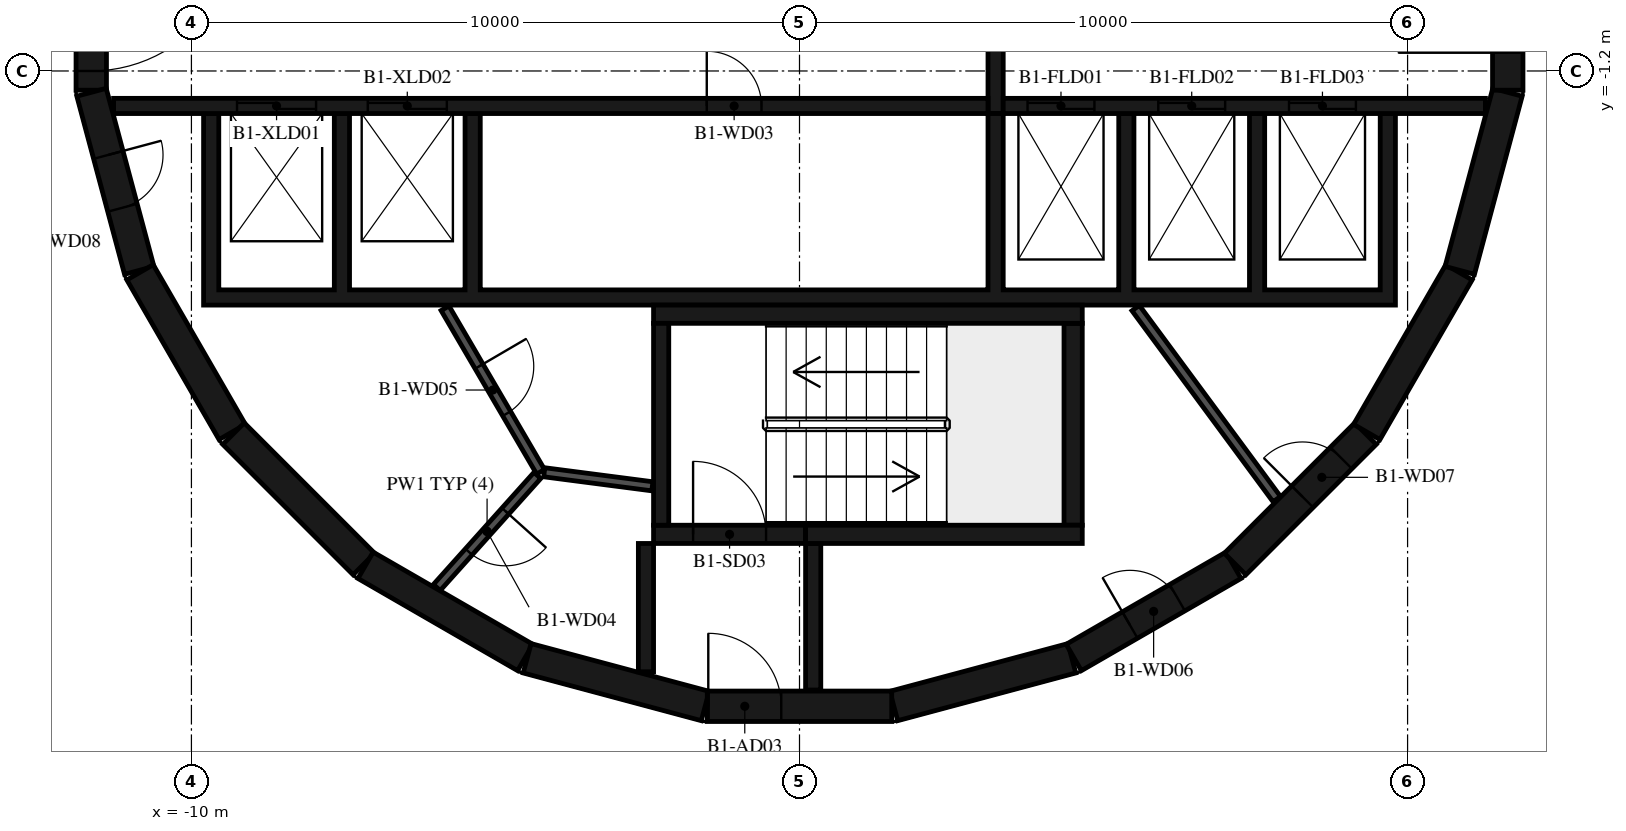
"""IFC4 building model, lengths in metres.
Left out: names, types, materials, properties, quantities, classifications, styles, units other than length and angle.
Written with IfcOpenShell. Run it as: python <this file> out.ifc"""

import sys

from ifc_helpers import new_model, si_unit, direction, frame, frame_2d, origin, place, context, subcontext, project, spatial, polyline, rectangle, outline, extrude, element, fill, save


model = new_model("IFC4")
c1 = context("Model", 3, precision=1e-05, world=origin(), true_north=direction((0.0, 1.0)))
c2 = subcontext(c1, "Body", "Model", "MODEL_VIEW")
j1 = project(units=[si_unit("LENGTHUNIT", "METRE"), si_unit("PLANEANGLEUNIT", "RADIAN")], contexts=[c1])
p1 = place(None, origin())
s1 = spatial("IfcSite", under=j1, at=p1, CompositionType="ELEMENT")
p2 = place(p1, origin())
s2 = spatial("IfcBuilding", under=s1, at=p2, CompositionType="ELEMENT")
p3 = place(p2, frame((0.0, 0.0, -4.2)))
s3 = spatial("IfcBuildingStorey", under=s2, at=p3, CompositionType="ELEMENT", Elevation=-4.2)
p4 = place(p3, frame((1.55, -11.643, 0.0), z_axis=(0.0, 0.0, 1.0), x_axis=(0.965948410781, 0.258734743916, 0.0)))
e1 = element("IfcWall", 1, at=p4, inside=s3, PredefinedType="SHEAR", context=c2, shape_type="SweptSolid", body=[
    extrude(rectangle(XDim=3.033, YDim=0.5, at=frame_2d((1.516, 0.0))), origin(), (0.0, 0.0, 1.0), 3.78),
])
p5 = place(p3, frame((4.51, -10.845, 0.0), z_axis=(0.0, 0.0, 1.0), x_axis=(0.865975092491, 0.500087131594, 0.0)))
e2 = element("IfcWall", 2, at=p5, inside=s3, PredefinedType="SHEAR", context=c2, shape_type="SweptSolid", body=[
    extrude(rectangle(XDim=3.033, YDim=0.5, at=frame_2d((1.516, 0.0))), origin(), (0.0, 0.0, 1.0), 3.78),
])
p6 = place(p5, frame((1.066, 0.0, 0.0)))
e3 = element("IfcOpeningElement", 3, at=p6, cuts=e2, PredefinedType="OPENING", context=c2, shape_type="SweptSolid", body=[
    extrude(rectangle(XDim=0.9, YDim=2.1, at=frame_2d((0.45, 1.05))), frame((0.0, 0.26, 0.0), z_axis=(0.0, -1.0, 0.0), x_axis=(1.0, 0.0, 0.0)), (0.0, 0.0, 1.0), 0.52),
])
p7 = place(p3, frame((7.164, -9.308, 0.0), z_axis=(0.0, 0.0, 1.0), x_axis=(0.707106781187, 0.707106781187, 0.0)))
e4 = element("IfcWall", 4, at=p7, inside=s3, PredefinedType="SHEAR", context=c2, shape_type="SweptSolid", body=[
    extrude(rectangle(XDim=3.032, YDim=0.5, at=frame_2d((1.516, 0.0))), origin(), (0.0, 0.0, 1.0), 3.78),
])
p8 = place(p7, frame((1.566, 0.0, 0.0)))
e5 = element("IfcOpeningElement", 5, at=p8, cuts=e4, PredefinedType="OPENING", context=c2, shape_type="SweptSolid", body=[
    extrude(rectangle(XDim=0.9, YDim=2.1, at=frame_2d((0.45, 1.05))), frame((0.0, 0.26, 0.0), z_axis=(0.0, -1.0, 0.0), x_axis=(1.0, 0.0, 0.0)), (0.0, 0.0, 1.0), 0.52),
])
for number, where, z_axis, x_axis in (
    (6, (9.329, -7.137, 0.0), (0.0, 0.0, 1.0), (0.5, 0.866, 0.0)),
    (7, (10.858, -4.479, 0.0), (0.0, 0.0, 1.0), (0.259, 0.966, 0.0)),
):
    element("IfcWall", number, at=place(p3, frame(where, z_axis=z_axis, x_axis=x_axis)), inside=s3, PredefinedType="SHEAR", context=c2, shape_type="SweptSolid", body=[
        extrude(rectangle(XDim=3.033, YDim=0.5, at=frame_2d((1.516, 0.0))), origin(), (0.0, 0.0, 1.0), 3.78),
    ])
p9 = place(p3, frame((11.647, -1.516, 0.0), z_axis=(0.0, 0.0, 1.0), x_axis=(0.0, 1.0, 0.0)))
e8 = element("IfcWall", 8, at=p9, inside=s3, PredefinedType="SHEAR", context=c2, shape_type="SweptSolid", body=[
    extrude(rectangle(XDim=3.033, YDim=0.5, at=frame_2d((1.516, 0.0))), origin(), (0.0, 0.0, 1.0), 3.78),
])
p10 = place(p9, frame((0.616, 0.0, 0.0)))
e9 = element("IfcOpeningElement", 9, at=p10, cuts=e8, PredefinedType="OPENING", context=c2, shape_type="SweptSolid", body=[
    extrude(rectangle(XDim=1.8, YDim=2.1, at=frame_2d((0.9, 1.05))), frame((0.0, 0.26, 0.0), z_axis=(0.0, -1.0, 0.0), x_axis=(1.0, 0.0, 0.0)), (0.0, 0.0, 1.0), 0.52),
])
p11 = place(p3, frame((-11.647, 1.516, 0.0), z_axis=(0.0, 0.0, 1.0), x_axis=(0.0, -1.0, 0.0)))
e10 = element("IfcWall", 10, at=p11, inside=s3, PredefinedType="SHEAR", context=c2, shape_type="SweptSolid", body=[
    extrude(rectangle(XDim=3.033, YDim=0.5, at=frame_2d((1.516, 0.0))), origin(), (0.0, 0.0, 1.0), 3.78),
])
p12 = place(p11, frame((0.316, 0.0, 0.0)))
e11 = element("IfcOpeningElement", 11, at=p12, cuts=e10, PredefinedType="OPENING", context=c2, shape_type="SweptSolid", body=[
    extrude(rectangle(XDim=2.4, YDim=2.1, at=frame_2d((1.2, 1.05))), frame((0.0, 0.26, 0.0), z_axis=(0.0, -1.0, 0.0), x_axis=(1.0, 0.0, 0.0)), (0.0, 0.0, 1.0), 0.52),
])
p13 = place(p3, frame((-11.643, -1.55, 0.0), z_axis=(0.0, 0.0, 1.0), x_axis=(0.258734743916, -0.965948410781, 0.0)))
e12 = element("IfcWall", 12, at=p13, inside=s3, PredefinedType="SHEAR", context=c2, shape_type="SweptSolid", body=[
    extrude(rectangle(XDim=3.033, YDim=0.5, at=frame_2d((1.516, 0.0))), origin(), (0.0, 0.0, 1.0), 3.78),
])
p14 = place(p13, frame((1.066, 0.0, 0.0)))
e13 = element("IfcOpeningElement", 13, at=p14, cuts=e12, PredefinedType="OPENING", context=c2, shape_type="SweptSolid", body=[
    extrude(rectangle(XDim=0.9, YDim=2.1, at=frame_2d((0.45, 1.05))), frame((0.0, 0.26, 0.0), z_axis=(0.0, -1.0, 0.0), x_axis=(1.0, 0.0, 0.0)), (0.0, 0.0, 1.0), 0.52),
])
p15 = place(p3, frame((-10.845, -4.51, 0.0), z_axis=(0.0, 0.0, 1.0), x_axis=(0.500087131594, -0.865975092491, 0.0)))
e14 = element("IfcWall", 14, at=p15, inside=s3, PredefinedType="SHEAR", context=c2, shape_type="SweptSolid", body=[
    extrude(rectangle(XDim=3.033, YDim=0.5, at=frame_2d((1.516, 0.0))), origin(), (0.0, 0.0, 1.0), 3.78),
])
p16 = place(p3, frame((-9.308, -7.164, 0.0), z_axis=(0.0, 0.0, 1.0), x_axis=(0.707106781187, -0.707106781187, 0.0)))
e15 = element("IfcWall", 15, at=p16, inside=s3, PredefinedType="SHEAR", context=c2, shape_type="SweptSolid", body=[
    extrude(rectangle(XDim=3.032, YDim=0.5, at=frame_2d((1.516, 0.0))), origin(), (0.0, 0.0, 1.0), 3.78),
])
for number, where, z_axis, x_axis in (
    (16, (-7.137, -9.329, 0.0), (0.0, 0.0, 1.0), (0.866, -0.5, 0.0)),
    (17, (-4.479, -10.858, 0.0), (0.0, 0.0, 1.0), (0.966, -0.259, 0.0)),
):
    element("IfcWall", number, at=place(p3, frame(where, z_axis=z_axis, x_axis=x_axis)), inside=s3, PredefinedType="SHEAR", context=c2, shape_type="SweptSolid", body=[
        extrude(rectangle(XDim=3.033, YDim=0.5, at=frame_2d((1.516, 0.0))), origin(), (0.0, 0.0, 1.0), 3.78),
    ])
p17 = place(p3, frame((-1.516, -11.647, 0.0), z_axis=(0.0, 0.0, 1.0), x_axis=(1.0, 0.0, 0.0)))
e18 = element("IfcWall", 18, at=p17, inside=s3, PredefinedType="SHEAR", context=c2, shape_type="SweptSolid", body=[
    extrude(rectangle(XDim=3.033, YDim=0.5, at=frame_2d((1.516, 0.0))), origin(), (0.0, 0.0, 1.0), 3.78),
])
p18 = place(p17, frame((0.016, 0.0, 0.0)))
e19 = element("IfcOpeningElement", 19, at=p18, cuts=e18, PredefinedType="OPENING", context=c2, shape_type="SweptSolid", body=[
    extrude(rectangle(XDim=1.2, YDim=2.1, at=frame_2d((0.6, 1.05))), frame((0.0, 0.26, 0.0), z_axis=(0.0, -1.0, 0.0), x_axis=(1.0, 0.0, 0.0)), (0.0, 0.0, 1.0), 0.52),
])
p19 = place(p3, frame((-2.275, -8.67, 0.0), z_axis=(0.0, 0.0, 1.0), x_axis=(0.0, 1.0, 0.0)))
e20 = element("IfcWall", 20, at=p19, inside=s3, PredefinedType="SHEAR", context=c2, shape_type="SweptSolid", body=[
    extrude(rectangle(XDim=3.32, YDim=0.25, at=frame_2d((1.66, 0.0))), origin(), (0.0, 0.0, 1.0), 3.78),
])
p20 = place(p3, frame((-2.4, -5.2, 0.0), z_axis=(0.0, 0.0, 1.0), x_axis=(1.0, 0.0, 0.0)))
e21 = element("IfcWall", 21, at=p20, inside=s3, PredefinedType="SHEAR", context=c2, shape_type="SweptSolid", body=[
    extrude(rectangle(XDim=7.05, YDim=0.3, at=frame_2d((3.525, 0.0))), origin(), (0.0, 0.0, 1.0), 3.78),
])
p21 = place(p3, frame((4.5, -8.67, 0.0), z_axis=(0.0, 0.0, 1.0), x_axis=(0.0, 1.0, 0.0)))
e22 = element("IfcWall", 22, at=p21, inside=s3, PredefinedType="SHEAR", context=c2, shape_type="SweptSolid", body=[
    extrude(rectangle(XDim=3.32, YDim=0.3, at=frame_2d((1.66, 0.0))), origin(), (0.0, 0.0, 1.0), 3.78),
])
p22 = place(p3, frame((0.1, -8.82, 0.0), z_axis=(0.0, 0.0, 1.0), x_axis=(1.0, 0.0, 0.0)))
e23 = element("IfcWall", 23, at=p22, inside=s3, PredefinedType="SHEAR", context=c2, shape_type="SweptSolid", body=[
    extrude(rectangle(XDim=4.55, YDim=0.3, at=frame_2d((2.275, 0.0))), origin(), (0.0, 0.0, 1.0), 3.78),
])
p23 = place(p3, frame((-2.4, -8.82, 0.0), z_axis=(0.0, 0.0, 1.0), x_axis=(1.0, 0.0, 0.0)))
e24 = element("IfcWall", 24, at=p23, inside=s3, PredefinedType="SHEAR", context=c2, shape_type="SweptSolid", body=[
    extrude(rectangle(XDim=2.5, YDim=0.3, at=frame_2d((1.25, 0.0))), origin(), (0.0, 0.0, 1.0), 3.78),
])
p24 = place(p23, frame((0.65, 0.0, 0.0)))
e25 = element("IfcOpeningElement", 25, at=p24, cuts=e24, PredefinedType="OPENING", context=c2, shape_type="SweptSolid", body=[
    extrude(rectangle(XDim=1.2, YDim=2.1, at=frame_2d((0.6, 1.05))), frame((0.0, 0.16, 0.0), z_axis=(0.0, -1.0, 0.0), x_axis=(1.0, 0.0, 0.0)), (0.0, 0.0, 1.0), 0.32),
])
p25 = place(p3, frame((-2.525, -8.97, 0.0), z_axis=(0.0, 0.0, 1.0), x_axis=(0.0, -1.0, 0.0)))
e26 = element("IfcWall", 26, at=p25, inside=s3, PredefinedType="SHEAR", context=c2, shape_type="SweptSolid", body=[
    extrude(rectangle(XDim=2.11, YDim=0.25, at=frame_2d((1.055, 0.0))), origin(), (0.0, 0.0, 1.0), 3.78),
])
p26 = place(p3, frame((0.225, -8.97, 0.0), z_axis=(0.0, 0.0, 1.0), x_axis=(0.0, -1.0, 0.0)))
e27 = element("IfcWall", 27, at=p26, inside=s3, PredefinedType="SHEAR", context=c2, shape_type="SweptSolid", body=[
    extrude(rectangle(XDim=2.41, YDim=0.25, at=frame_2d((1.205, 0.0))), origin(), (0.0, 0.0, 1.0), 3.78),
])
p27 = place(p3, origin())
e28 = element("IfcWall", 28, at=p27, inside=s3, PredefinedType="SHEAR", context=c2, shape_type="SweptSolid", body=[
    extrude(outline(polyline([(9.8, -5.05), (9.8, -4.8), (9.8, -1.9), (9.55, -1.9), (9.55, -4.8), (7.65, -4.8), (7.65, -1.9), (7.4, -1.9), (7.4, -4.8), (5.5, -4.8), (5.5, -1.9), (5.25, -1.9), (5.25, -4.8), (3.35, -4.8), (3.35, -1.9), (3.1, -1.9), (3.1, -4.8), (-5.25, -4.8), (-5.25, -1.9), (-5.5, -1.9), (-5.5, -4.8), (-7.4, -4.8), (-7.4, -1.9), (-7.65, -1.9), (-7.65, -4.8), (-9.55, -4.8), (-9.55, -1.9), (-9.8, -1.9), (-9.8, -4.8), (-9.8, -5.05), (9.8, -5.05)])), origin(), (0.0, 0.0, 1.0), 3.78),
])
p28 = place(p3, frame((-11.28, -1.775, 0.0), z_axis=(0.0, 0.0, 1.0), x_axis=(1.0, 0.0, 0.0)))
e29 = element("IfcWall", 29, at=p28, inside=s3, PredefinedType="SHEAR", context=c2, shape_type="SweptSolid", body=[
    extrude(rectangle(XDim=14.38, YDim=0.25, at=frame_2d((7.19, 0.0))), origin(), (0.0, 0.0, 1.0), 3.78),
])
p29 = place(p28, frame((2.03, 0.0, 0.0)))
e30 = element("IfcOpeningElement", 30, at=p29, cuts=e29, PredefinedType="OPENING", context=c2, shape_type="SweptSolid", body=[
    extrude(rectangle(XDim=1.3, YDim=2.1, at=frame_2d((0.65, 1.05))), frame((0.0, 0.135, 0.0), z_axis=(0.0, -1.0, 0.0), x_axis=(1.0, 0.0, 0.0)), (0.0, 0.0, 1.0), 0.27),
])
p30 = place(p28, frame((4.18, 0.0, 0.0)))
e31 = element("IfcOpeningElement", 31, at=p30, cuts=e29, PredefinedType="OPENING", context=c2, shape_type="SweptSolid", body=[
    extrude(rectangle(XDim=1.3, YDim=2.1, at=frame_2d((0.65, 1.05))), frame((0.0, 0.135, 0.0), z_axis=(0.0, -1.0, 0.0), x_axis=(1.0, 0.0, 0.0)), (0.0, 0.0, 1.0), 0.27),
])
p31 = place(p28, frame((9.755, 0.0, 0.0)))
e32 = element("IfcOpeningElement", 32, at=p31, cuts=e29, PredefinedType="OPENING", context=c2, shape_type="SweptSolid", body=[
    extrude(rectangle(XDim=0.9, YDim=2.1, at=frame_2d((0.45, 1.05))), frame((0.0, 0.135, 0.0), z_axis=(0.0, -1.0, 0.0), x_axis=(1.0, 0.0, 0.0)), (0.0, 0.0, 1.0), 0.27),
])
p32 = place(p3, frame((3.35, -1.775, 0.0), z_axis=(0.0, 0.0, 1.0), x_axis=(1.0, 0.0, 0.0)))
e33 = element("IfcWall", 33, at=p32, inside=s3, PredefinedType="SHEAR", context=c2, shape_type="SweptSolid", body=[
    extrude(rectangle(XDim=7.93, YDim=0.25, at=frame_2d((3.965, 0.0))), origin(), (0.0, 0.0, 1.0), 3.78),
])
p33 = place(p32, frame((0.4, 0.0, 0.0)))
e34 = element("IfcOpeningElement", 34, at=p33, cuts=e33, PredefinedType="OPENING", context=c2, shape_type="SweptSolid", body=[
    extrude(rectangle(XDim=1.1, YDim=2.4, at=frame_2d((0.55, 1.2))), frame((0.0, 0.135, 0.0), z_axis=(0.0, -1.0, 0.0), x_axis=(1.0, 0.0, 0.0)), (0.0, 0.0, 1.0), 0.27),
])
p34 = place(p32, frame((2.55, 0.0, 0.0)))
e35 = element("IfcOpeningElement", 35, at=p34, cuts=e33, PredefinedType="OPENING", context=c2, shape_type="SweptSolid", body=[
    extrude(rectangle(XDim=1.1, YDim=2.4, at=frame_2d((0.55, 1.2))), frame((0.0, 0.135, 0.0), z_axis=(0.0, -1.0, 0.0), x_axis=(1.0, 0.0, 0.0)), (0.0, 0.0, 1.0), 0.27),
])
p35 = place(p32, frame((4.7, 0.0, 0.0)))
e36 = element("IfcOpeningElement", 36, at=p35, cuts=e33, PredefinedType="OPENING", context=c2, shape_type="SweptSolid", body=[
    extrude(rectangle(XDim=1.1, YDim=2.4, at=frame_2d((0.55, 1.2))), frame((0.0, 0.135, 0.0), z_axis=(0.0, -1.0, 0.0), x_axis=(1.0, 0.0, 0.0)), (0.0, 0.0, 1.0), 0.27),
])
p36 = place(p3, frame((3.225, -1.9, 0.0), z_axis=(0.0, 0.0, 1.0), x_axis=(0.0, 1.0, 0.0)))
e37 = element("IfcWall", 37, at=p36, inside=s3, PredefinedType="SHEAR", context=c2, shape_type="SweptSolid", body=[
    extrude(rectangle(XDim=3.8, YDim=0.25, at=frame_2d((1.9, 0.0))), origin(), (0.0, 0.0, 1.0), 3.78),
])
p37 = place(p3, frame((5.528, -5.098, 0.0), z_axis=(0.0, 0.0, 1.0), x_axis=(0.594034318069, -0.804439698769, 0.0)))
e38 = element("IfcWall", 38, at=p37, inside=s3, PredefinedType="PARTITIONING", context=c2, shape_type="SweptSolid", body=[
    extrude(rectangle(XDim=3.907, YDim=0.15, at=frame_2d((1.953, 0.0))), origin(), (0.0, 0.0, 1.0), 3.78),
])
p38 = place(p3, frame((-5.829, -5.102, 0.0), z_axis=(0.0, 0.0, 1.0), x_axis=(0.504480008384, -0.863423373057, 0.0)))
e39 = element("IfcWall", 39, at=p38, inside=s3, PredefinedType="PARTITIONING", context=c2, shape_type="SweptSolid", body=[
    extrude(rectangle(XDim=3.115, YDim=0.15, at=frame_2d((1.558, 0.0))), origin(), (0.0, 0.0, 1.0), 3.78),
])
p39 = place(p38, frame((1.107, 0.0, 0.0)))
e40 = element("IfcOpeningElement", 40, at=p39, cuts=e39, PredefinedType="OPENING", context=c2, shape_type="SweptSolid", body=[
    extrude(rectangle(XDim=0.9, YDim=2.1, at=frame_2d((0.45, 1.05))), frame((0.0, 0.085, 0.0), z_axis=(0.0, -1.0, 0.0), x_axis=(1.0, 0.0, 0.0)), (0.0, 0.0, 1.0), 0.17),
])
p40 = place(p3, frame((-4.311, -7.851, 0.0), z_axis=(0.0, 0.0, 1.0), x_axis=(-0.667869133096, -0.744278725383, 0.0)))
e41 = element("IfcWall", 41, at=p40, inside=s3, PredefinedType="PARTITIONING", context=c2, shape_type="SweptSolid", body=[
    extrude(rectangle(XDim=2.476, YDim=0.15, at=frame_2d((1.238, 0.0))), origin(), (0.0, 0.0, 1.0), 3.78),
])
p41 = place(p40, frame((0.788, 0.0, 0.0)))
e42 = element("IfcOpeningElement", 42, at=p41, cuts=e41, PredefinedType="OPENING", context=c2, shape_type="SweptSolid", body=[
    extrude(rectangle(XDim=0.9, YDim=2.1, at=frame_2d((0.45, 1.05))), frame((0.0, 0.085, 0.0), z_axis=(0.0, -1.0, 0.0), x_axis=(1.0, 0.0, 0.0)), (0.0, 0.0, 1.0), 0.17),
])
p42 = place(p3, frame((-4.198, -7.799, 0.0), z_axis=(0.0, 0.0, 1.0), x_axis=(0.991686747293, -0.128675542523, 0.0)))
e43 = element("IfcWall", 43, at=p42, inside=s3, PredefinedType="PARTITIONING", context=c2, shape_type="SweptSolid", body=[
    extrude(rectangle(XDim=1.793, YDim=0.15, at=frame_2d((0.896, 0.0))), origin(), (0.0, 0.0, 1.0), 3.78),
])
p43 = place(p24, origin())
e44 = element("IfcDoor", 44, at=p43, inside=s3, OperationType="SINGLE_SWING_LEFT", PredefinedType="DOOR", context=c2, shape_type="SweptSolid", body=[
    extrude(rectangle(XDim=1.2, YDim=2.1, at=frame_2d((0.6, 1.05))), frame((0.0, 0.025, 0.0), z_axis=(0.0, -1.0, 0.0), x_axis=(1.0, 0.0, 0.0)), (0.0, 0.0, 1.0), 0.05),
])
fill(e25, e44)
p44 = place(p18, origin())
e45 = element("IfcDoor", 45, at=p44, inside=s3, OperationType="SINGLE_SWING_RIGHT", PredefinedType="DOOR", context=c2, shape_type="SweptSolid", body=[
    extrude(rectangle(XDim=1.2, YDim=2.1, at=frame_2d((0.6, 1.05))), frame((0.0, 0.025, 0.0), z_axis=(0.0, -1.0, 0.0), x_axis=(1.0, 0.0, 0.0)), (0.0, 0.0, 1.0), 0.05),
])
fill(e19, e45)
p45 = place(p12, origin())
e46 = element("IfcDoor", 46, at=p45, inside=s3, OperationType="DOUBLE_DOOR_SINGLE_SWING", PredefinedType="DOOR", context=c2, shape_type="SweptSolid", body=[
    extrude(rectangle(XDim=2.4, YDim=2.1, at=frame_2d((1.2, 1.05))), frame((0.0, 0.025, 0.0), z_axis=(0.0, -1.0, 0.0), x_axis=(1.0, 0.0, 0.0)), (0.0, 0.0, 1.0), 0.05),
])
fill(e11, e46)
p46 = place(p10, origin())
e47 = element("IfcDoor", 47, at=p46, inside=s3, OperationType="DOUBLE_DOOR_SINGLE_SWING", PredefinedType="DOOR", context=c2, shape_type="SweptSolid", body=[
    extrude(rectangle(XDim=1.8, YDim=2.1, at=frame_2d((0.9, 1.05))), frame((0.0, 0.025, 0.0), z_axis=(0.0, -1.0, 0.0), x_axis=(1.0, 0.0, 0.0)), (0.0, 0.0, 1.0), 0.05),
])
fill(e9, e47)
p47 = place(p29, origin())
e48 = element("IfcDoor", 48, at=p47, inside=s3, OperationType="DOUBLE_DOOR_SLIDING", PredefinedType="DOOR", context=c2, shape_type="SweptSolid", body=[
    extrude(rectangle(XDim=1.3, YDim=2.1, at=frame_2d((0.65, 1.05))), frame((0.0, 0.025, 0.0), z_axis=(0.0, -1.0, 0.0), x_axis=(1.0, 0.0, 0.0)), (0.0, 0.0, 1.0), 0.05),
])
fill(e30, e48)
p48 = place(p30, origin())
e49 = element("IfcDoor", 49, at=p48, inside=s3, OperationType="DOUBLE_DOOR_SLIDING", PredefinedType="DOOR", context=c2, shape_type="SweptSolid", body=[
    extrude(rectangle(XDim=1.3, YDim=2.1, at=frame_2d((0.65, 1.05))), frame((0.0, 0.025, 0.0), z_axis=(0.0, -1.0, 0.0), x_axis=(1.0, 0.0, 0.0)), (0.0, 0.0, 1.0), 0.05),
])
fill(e31, e49)
p49 = place(p33, origin())
e50 = element("IfcDoor", 50, at=p49, inside=s3, OperationType="DOUBLE_DOOR_SLIDING", PredefinedType="DOOR", context=c2, shape_type="SweptSolid", body=[
    extrude(rectangle(XDim=1.1, YDim=2.4, at=frame_2d((0.55, 1.2))), frame((0.0, 0.025, 0.0), z_axis=(0.0, -1.0, 0.0), x_axis=(1.0, 0.0, 0.0)), (0.0, 0.0, 1.0), 0.05),
])
fill(e34, e50)
p50 = place(p34, origin())
e51 = element("IfcDoor", 51, at=p50, inside=s3, OperationType="DOUBLE_DOOR_SLIDING", PredefinedType="DOOR", context=c2, shape_type="SweptSolid", body=[
    extrude(rectangle(XDim=1.1, YDim=2.4, at=frame_2d((0.55, 1.2))), frame((0.0, 0.025, 0.0), z_axis=(0.0, -1.0, 0.0), x_axis=(1.0, 0.0, 0.0)), (0.0, 0.0, 1.0), 0.05),
])
fill(e35, e51)
p51 = place(p35, origin())
e52 = element("IfcDoor", 52, at=p51, inside=s3, OperationType="DOUBLE_DOOR_SLIDING", PredefinedType="DOOR", context=c2, shape_type="SweptSolid", body=[
    extrude(rectangle(XDim=1.1, YDim=2.4, at=frame_2d((0.55, 1.2))), frame((0.0, 0.025, 0.0), z_axis=(0.0, -1.0, 0.0), x_axis=(1.0, 0.0, 0.0)), (0.0, 0.0, 1.0), 0.05),
])
fill(e36, e52)
p52 = place(p31, origin())
e53 = element("IfcDoor", 53, at=p52, inside=s3, OperationType="SINGLE_SWING_RIGHT", PredefinedType="DOOR", context=c2, shape_type="SweptSolid", body=[
    extrude(rectangle(XDim=0.9, YDim=2.1, at=frame_2d((0.45, 1.05))), frame((0.0, 0.025, 0.0), z_axis=(0.0, -1.0, 0.0), x_axis=(1.0, 0.0, 0.0)), (0.0, 0.0, 1.0), 0.05),
])
fill(e32, e53)
p53 = place(p41, origin())
e54 = element("IfcDoor", 54, at=p53, inside=s3, OperationType="SINGLE_SWING_LEFT", PredefinedType="DOOR", context=c2, shape_type="SweptSolid", body=[
    extrude(rectangle(XDim=0.9, YDim=2.1, at=frame_2d((0.45, 1.05))), frame((0.0, 0.025, 0.0), z_axis=(0.0, -1.0, 0.0), x_axis=(1.0, 0.0, 0.0)), (0.0, 0.0, 1.0), 0.05),
])
fill(e42, e54)
p54 = place(p39, origin())
e55 = element("IfcDoor", 55, at=p54, inside=s3, OperationType="SINGLE_SWING_RIGHT", PredefinedType="DOOR", context=c2, shape_type="SweptSolid", body=[
    extrude(rectangle(XDim=0.9, YDim=2.1, at=frame_2d((0.45, 1.05))), frame((0.0, 0.025, 0.0), z_axis=(0.0, -1.0, 0.0), x_axis=(1.0, 0.0, 0.0)), (0.0, 0.0, 1.0), 0.05),
])
fill(e40, e55)
p55 = place(p6, origin())
e56 = element("IfcDoor", 56, at=p55, inside=s3, OperationType="SINGLE_SWING_LEFT", PredefinedType="DOOR", context=c2, shape_type="SweptSolid", body=[
    extrude(rectangle(XDim=0.9, YDim=2.1, at=frame_2d((0.45, 1.05))), frame((0.0, 0.025, 0.0), z_axis=(0.0, -1.0, 0.0), x_axis=(1.0, 0.0, 0.0)), (0.0, 0.0, 1.0), 0.05),
])
fill(e3, e56)
p56 = place(p8, origin())
e57 = element("IfcDoor", 57, at=p56, inside=s3, OperationType="SINGLE_SWING_RIGHT", PredefinedType="DOOR", context=c2, shape_type="SweptSolid", body=[
    extrude(rectangle(XDim=0.9, YDim=2.1, at=frame_2d((0.45, 1.05))), frame((0.0, 0.025, 0.0), z_axis=(0.0, -1.0, 0.0), x_axis=(1.0, 0.0, 0.0)), (0.0, 0.0, 1.0), 0.05),
])
fill(e5, e57)
p57 = place(p14, origin())
e58 = element("IfcDoor", 58, at=p57, inside=s3, OperationType="SINGLE_SWING_LEFT", PredefinedType="DOOR", context=c2, shape_type="SweptSolid", body=[
    extrude(rectangle(XDim=0.9, YDim=2.1, at=frame_2d((0.45, 1.05))), frame((0.0, 0.025, 0.0), z_axis=(0.0, -1.0, 0.0), x_axis=(1.0, 0.0, 0.0)), (0.0, 0.0, 1.0), 0.05),
])
fill(e13, e58)
save(model, sys.argv[1])
